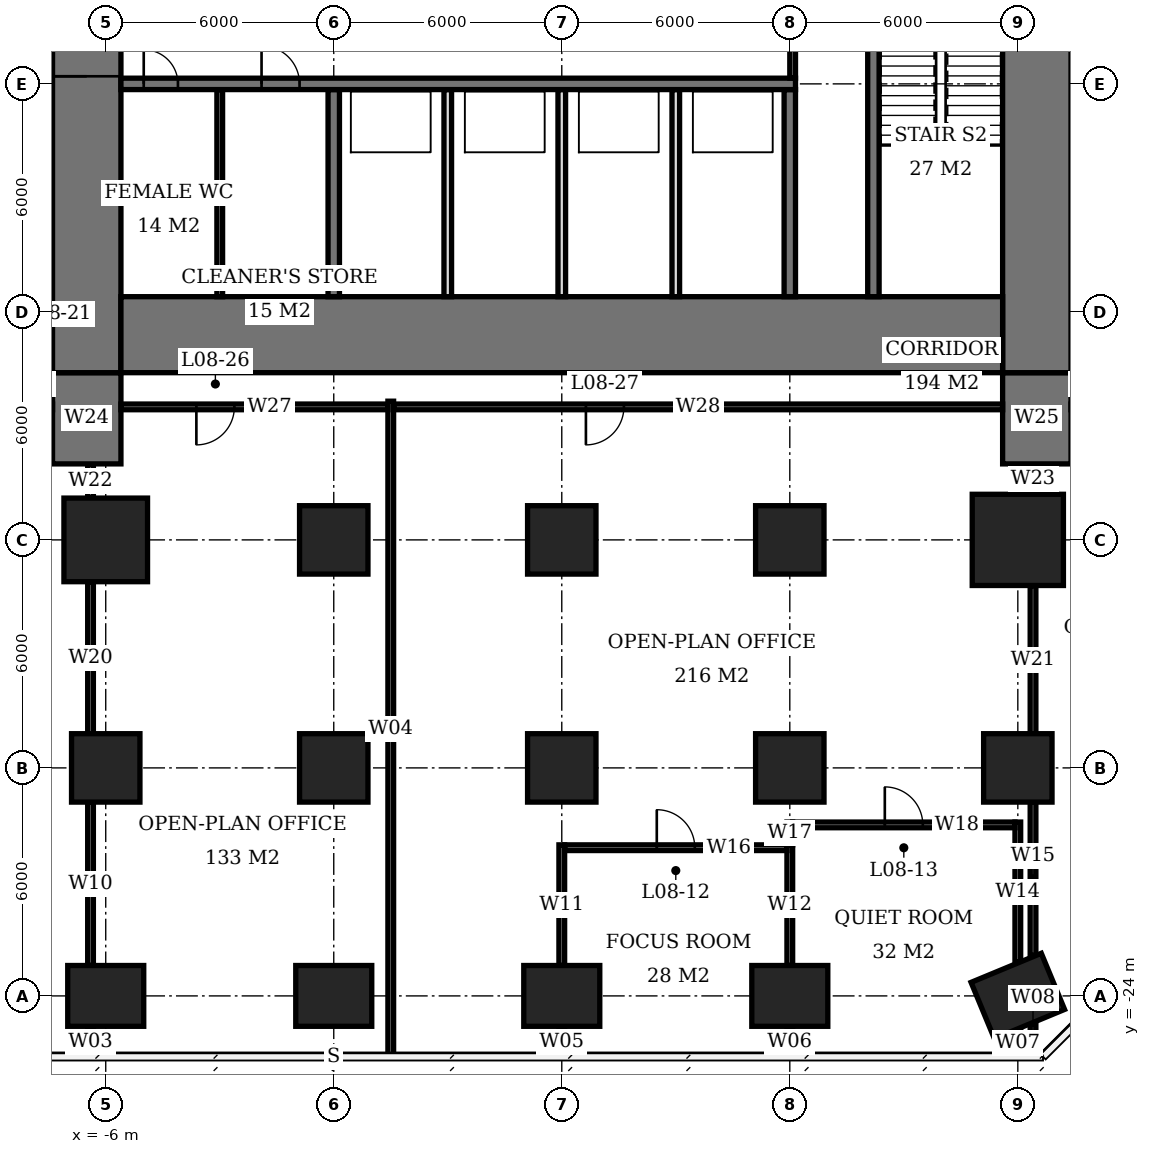
"""IFC4 building model, lengths in metres.
Left out: names, types, materials, properties, quantities, classifications, styles, units other than length and angle.
Written with IfcOpenShell. Run it as: python <this file> out.ifc"""

import sys

from ifc_helpers import new_model, si_unit, direction, frame, frame_2d, origin, origin_2d, place, context, subcontext, project, spatial, rectangle, extrude, element, fill, save


model = new_model("IFC4")
c1 = context("Model", 3, precision=1e-05, world=origin(), true_north=direction((0.0, 1.0)))
c2 = subcontext(c1, "Body", "Model", "MODEL_VIEW")
j1 = project(units=[si_unit("LENGTHUNIT", "METRE"), si_unit("PLANEANGLEUNIT", "RADIAN")], contexts=[c1])
p1 = place(None, origin())
s1 = spatial("IfcSite", under=j1, at=p1, CompositionType="ELEMENT")
p2 = place(p1, origin())
s2 = spatial("IfcBuilding", under=s1, at=p2, CompositionType="ELEMENT")
p3 = place(p2, frame((0.0, 0.0, 37.7)))
s3 = spatial("IfcBuildingStorey", under=s2, at=p3, CompositionType="ELEMENT", Elevation=37.7)
p4 = place(p3, frame((-6.0, -24.0, 0.0), z_axis=(0.0, 0.0, 1.0), x_axis=(1.0, 0.0, 0.0)))
e1 = element("IfcColumn", 1, at=p4, inside=s3, PredefinedType="COLUMN", context=c2, shape_type="SweptSolid", body=[
    extrude(rectangle(XDim=2.0, YDim=1.6, at=origin_2d()), origin(), (0.0, 0.0, 1.0), 3.9),
])
p5 = place(p3, frame((-6.0, -18.0, 0.0), z_axis=(0.0, 0.0, 1.0), x_axis=(1.0, 0.0, 0.0)))
e2 = element("IfcColumn", 2, at=p5, inside=s3, PredefinedType="COLUMN", context=c2, shape_type="SweptSolid", body=[
    extrude(rectangle(XDim=1.8, YDim=1.8, at=origin_2d()), origin(), (0.0, 0.0, 1.0), 3.9),
])
p6 = place(p3, frame((-6.0, -12.0, 0.0), z_axis=(0.0, 0.0, 1.0), x_axis=(1.0, 0.0, 0.0)))
e3 = element("IfcColumn", 3, at=p6, inside=s3, PredefinedType="COLUMN", context=c2, shape_type="SweptSolid", body=[
    extrude(rectangle(XDim=2.2, YDim=2.2, at=origin_2d()), origin(), (0.0, 0.0, 1.0), 3.9),
])
p7 = place(p3, frame((0.0, -24.0, 0.0), z_axis=(0.0, 0.0, 1.0), x_axis=(1.0, 0.0, 0.0)))
e4 = element("IfcColumn", 4, at=p7, inside=s3, PredefinedType="COLUMN", context=c2, shape_type="SweptSolid", body=[
    extrude(rectangle(XDim=2.0, YDim=1.6, at=origin_2d()), origin(), (0.0, 0.0, 1.0), 3.9),
])
for number, where, z_axis, x_axis in (
    (5, (0.0, -18.0, 0.0), (0.0, 0.0, 1.0), (1.0, 0.0, 0.0)),
    (6, (0.0, -12.0, 0.0), (0.0, 0.0, 1.0), (1.0, 0.0, 0.0)),
):
    element("IfcColumn", number, at=place(p3, frame(where, z_axis=z_axis, x_axis=x_axis)), inside=s3, PredefinedType="COLUMN", context=c2, shape_type="SweptSolid", body=[
        extrude(rectangle(XDim=1.8, YDim=1.8, at=origin_2d()), origin(), (0.0, 0.0, 1.0), 3.9),
    ])
p8 = place(p3, frame((6.0, -24.0, 0.0), z_axis=(0.0, 0.0, 1.0), x_axis=(1.0, 0.0, 0.0)))
e7 = element("IfcColumn", 7, at=p8, inside=s3, PredefinedType="COLUMN", context=c2, shape_type="SweptSolid", body=[
    extrude(rectangle(XDim=2.0, YDim=1.6, at=origin_2d()), origin(), (0.0, 0.0, 1.0), 3.9),
])
for number, where, z_axis, x_axis in (
    (8, (6.0, -18.0, 0.0), (0.0, 0.0, 1.0), (1.0, 0.0, 0.0)),
    (9, (6.0, -12.0, 0.0), (0.0, 0.0, 1.0), (1.0, 0.0, 0.0)),
):
    element("IfcColumn", number, at=place(p3, frame(where, z_axis=z_axis, x_axis=x_axis)), inside=s3, PredefinedType="COLUMN", context=c2, shape_type="SweptSolid", body=[
        extrude(rectangle(XDim=1.8, YDim=1.8, at=origin_2d()), origin(), (0.0, 0.0, 1.0), 3.9),
    ])
p9 = place(p3, frame((12.0, -24.0, 0.0), z_axis=(0.0, 0.0, 1.0), x_axis=(1.0, 0.0, 0.0)))
e10 = element("IfcColumn", 10, at=p9, inside=s3, PredefinedType="COLUMN", context=c2, shape_type="SweptSolid", body=[
    extrude(rectangle(XDim=2.0, YDim=1.6, at=origin_2d()), origin(), (0.0, 0.0, 1.0), 3.9),
])
for number, where, z_axis, x_axis in (
    (11, (12.0, -18.0, 0.0), (0.0, 0.0, 1.0), (1.0, 0.0, 0.0)),
    (12, (12.0, -12.0, 0.0), (0.0, 0.0, 1.0), (1.0, 0.0, 0.0)),
):
    element("IfcColumn", number, at=place(p3, frame(where, z_axis=z_axis, x_axis=x_axis)), inside=s3, PredefinedType="COLUMN", context=c2, shape_type="SweptSolid", body=[
        extrude(rectangle(XDim=1.8, YDim=1.8, at=origin_2d()), origin(), (0.0, 0.0, 1.0), 3.9),
    ])
p10 = place(p3, frame((18.0, -24.0, 0.0), z_axis=(0.0, 0.0, 1.0), x_axis=(-0.923879532511, -0.382683432365, 0.0)))
e13 = element("IfcColumn", 13, at=p10, inside=s3, PredefinedType="COLUMN", context=c2, shape_type="SweptSolid", body=[
    extrude(rectangle(XDim=2.0, YDim=1.6, at=origin_2d()), origin(), (0.0, 0.0, 1.0), 3.9),
])
p11 = place(p3, frame((18.0, -18.0, 0.0), z_axis=(0.0, 0.0, 1.0), x_axis=(1.0, 0.0, 0.0)))
e14 = element("IfcColumn", 14, at=p11, inside=s3, PredefinedType="COLUMN", context=c2, shape_type="SweptSolid", body=[
    extrude(rectangle(XDim=1.8, YDim=1.8, at=origin_2d()), origin(), (0.0, 0.0, 1.0), 3.9),
])
p12 = place(p3, frame((18.0, -12.0, 0.0), z_axis=(0.0, 0.0, 1.0), x_axis=(1.0, 0.0, 0.0)))
e15 = element("IfcColumn", 15, at=p12, inside=s3, PredefinedType="COLUMN", context=c2, shape_type="SweptSolid", body=[
    extrude(rectangle(XDim=2.4, YDim=2.4, at=origin_2d()), origin(), (0.0, 0.0, 1.0), 3.9),
])
p13 = place(p3, frame((-5.6, -6.6, 0.0), z_axis=(0.0, 0.0, 1.0), x_axis=(1.0, 0.0, 0.0)))
e16 = element("IfcWall", 16, at=p13, inside=s3, PredefinedType="SHEAR", context=c2, shape_type="SweptSolid", body=[
    extrude(rectangle(XDim=23.2, YDim=2.0, at=frame_2d((11.6, 0.0))), origin(), (0.0, 0.0, 1.0), 3.9),
])
p14 = place(p3, frame((-6.5, -7.6, 0.0), z_axis=(0.0, 0.0, 1.0), x_axis=(0.0, 1.0, 0.0)))
e17 = element("IfcWall", 17, at=p14, inside=s3, PredefinedType="SHEAR", context=c2, shape_type="SweptSolid", body=[
    extrude(rectangle(XDim=21.2, YDim=1.8, at=frame_2d((10.6, 0.0))), origin(), (0.0, 0.0, 1.0), 3.9),
])
p15 = place(p14, frame((7.8, 0.0, 0.0)))
e18 = element("IfcOpeningElement", 18, at=p15, cuts=e17, PredefinedType="OPENING", context=c2, shape_type="SweptSolid", body=[
    extrude(rectangle(XDim=1.8, YDim=2.4, at=frame_2d((0.9, 1.2))), frame((0.0, 0.91, 0.0), z_axis=(0.0, -1.0, 0.0), x_axis=(1.0, 0.0, 0.0)), (0.0, 0.0, 1.0), 1.82),
])
p16 = place(p3, frame((18.5, -7.6, 0.0), z_axis=(0.0, 0.0, 1.0), x_axis=(0.0, 1.0, 0.0)))
e19 = element("IfcWall", 19, at=p16, inside=s3, PredefinedType="SHEAR", context=c2, shape_type="SweptSolid", body=[
    extrude(rectangle(XDim=21.2, YDim=1.8, at=frame_2d((10.6, 0.0))), origin(), (0.0, 0.0, 1.0), 3.9),
])
p17 = place(p16, frame((9.2, 0.0, 0.0)))
e20 = element("IfcOpeningElement", 20, at=p17, cuts=e19, PredefinedType="OPENING", context=c2, shape_type="SweptSolid", body=[
    extrude(rectangle(XDim=1.8, YDim=2.4, at=frame_2d((0.9, 1.2))), frame((0.0, 0.91, 0.0), z_axis=(0.0, -1.0, 0.0), x_axis=(1.0, 0.0, 0.0)), (0.0, 0.0, 1.0), 1.82),
])
for number, where, z_axis, x_axis in (
    (21, (-6.5, -10.0, 0.0), (0.0, 0.0, 1.0), (0.0, 1.0, 0.0)),
    (22, (18.5, -10.0, 0.0), (0.0, 0.0, 1.0), (0.0, 1.0, 0.0)),
):
    element("IfcWall", number, at=place(p3, frame(where, z_axis=z_axis, x_axis=x_axis)), inside=s3, PredefinedType="SHEAR", context=c2, shape_type="SweptSolid", body=[
        extrude(rectangle(XDim=2.4, YDim=1.8, at=frame_2d((1.2, 0.0))), origin(), (0.0, 0.0, 1.0), 3.9),
    ])
p18 = place(p3, frame((-5.6, 0.0, 0.0), z_axis=(0.0, 0.0, 1.0), x_axis=(1.0, 0.0, 0.0)))
e23 = element("IfcWall", 23, at=p18, inside=s3, PredefinedType="SHEAR", context=c2, shape_type="SweptSolid", body=[
    extrude(rectangle(XDim=17.75, YDim=0.3, at=frame_2d((8.875, 0.0))), origin(), (0.0, 0.0, 1.0), 3.9),
])
p19 = place(p18, frame((0.6, 0.0, 0.0)))
e24 = element("IfcOpeningElement", 24, at=p19, cuts=e23, PredefinedType="OPENING", context=c2, shape_type="SweptSolid", body=[
    extrude(rectangle(XDim=0.9, YDim=2.1, at=frame_2d((0.45, 1.05))), frame((0.0, 0.16, 0.0), z_axis=(0.0, -1.0, 0.0), x_axis=(1.0, 0.0, 0.0)), (0.0, 0.0, 1.0), 0.32),
])
p20 = place(p18, frame((3.7, 0.0, 0.0)))
e25 = element("IfcOpeningElement", 25, at=p20, cuts=e23, PredefinedType="OPENING", context=c2, shape_type="SweptSolid", body=[
    extrude(rectangle(XDim=1.0, YDim=2.1, at=frame_2d((0.5, 1.05))), frame((0.0, 0.16, 0.0), z_axis=(0.0, -1.0, 0.0), x_axis=(1.0, 0.0, 0.0)), (0.0, 0.0, 1.0), 0.32),
])
for number, where, z_axis, x_axis in (
    (26, (0.0, -5.6, 0.0), (0.0, 0.0, 1.0), (0.0, 1.0, 0.0)),
    (27, (12.0, -5.6, 0.0), (0.0, 0.0, 1.0), (0.0, 1.0, 0.0)),
):
    element("IfcWall", number, at=place(p3, frame(where, z_axis=z_axis, x_axis=x_axis)), inside=s3, PredefinedType="SHEAR", context=c2, shape_type="SweptSolid", body=[
        extrude(rectangle(XDim=5.45, YDim=0.3, at=frame_2d((2.725, 0.0))), origin(), (0.0, 0.0, 1.0), 3.9),
    ])
p21 = place(p3, frame((14.2, -5.6, 0.0), z_axis=(0.0, 0.0, 1.0), x_axis=(0.0, 1.0, 0.0)))
e28 = element("IfcWall", 28, at=p21, inside=s3, PredefinedType="SHEAR", context=c2, shape_type="SweptSolid", body=[
    extrude(rectangle(XDim=8.45, YDim=0.3, at=frame_2d((4.225, 0.0))), origin(), (0.0, 0.0, 1.0), 3.9),
])
for number, where, z_axis, x_axis in (
    (29, (3.0, -5.6, 0.0), (0.0, 0.0, 1.0), (0.0, 1.0, 0.0)),
    (30, (6.0, -5.6, 0.0), (0.0, 0.0, 1.0), (0.0, 1.0, 0.0)),
    (31, (9.0, -5.6, 0.0), (0.0, 0.0, 1.0), (0.0, 1.0, 0.0)),
):
    element("IfcWall", number, at=place(p3, frame(where, z_axis=z_axis, x_axis=x_axis)), inside=s3, PredefinedType="SOLIDWALL", context=c2, shape_type="SweptSolid", body=[
        extrude(rectangle(XDim=5.45, YDim=0.2, at=frame_2d((2.725, 0.0))), origin(), (0.0, 0.0, 1.0), 3.9),
    ])
p22 = place(p3, frame((-3.0, -5.6, 0.0), z_axis=(0.0, 0.0, 1.0), x_axis=(0.0, 1.0, 0.0)))
e32 = element("IfcWall", 32, at=p22, inside=s3, PredefinedType="PLUMBINGWALL", context=c2, shape_type="SweptSolid", body=[
    extrude(rectangle(XDim=5.45, YDim=0.15, at=frame_2d((2.725, 0.0))), origin(), (0.0, 0.0, 1.0), 3.65),
])
p23 = place(p3, frame((6.075, -20.1, 0.0), z_axis=(0.0, 0.0, 1.0), x_axis=(1.0, 0.0, 0.0)))
e33 = element("IfcWall", 33, at=p23, inside=s3, PredefinedType="PARTITIONING", context=c2, shape_type="SweptSolid", body=[
    extrude(rectangle(XDim=5.85, YDim=0.15, at=frame_2d((2.925, 0.0))), origin(), (0.0, 0.0, 1.0), 3.65),
])
p24 = place(p23, frame((2.425, 0.0, 0.0)))
e34 = element("IfcOpeningElement", 34, at=p24, cuts=e33, PredefinedType="OPENING", context=c2, shape_type="SweptSolid", body=[
    extrude(rectangle(XDim=1.0, YDim=2.1, at=frame_2d((0.5, 1.05))), frame((0.0, 0.085, 0.0), z_axis=(0.0, -1.0, 0.0), x_axis=(1.0, 0.0, 0.0)), (0.0, 0.0, 1.0), 0.17),
])
p25 = place(p3, frame((12.075, -19.5, 0.0), z_axis=(0.0, 0.0, 1.0), x_axis=(1.0, 0.0, 0.0)))
e35 = element("IfcWall", 35, at=p25, inside=s3, PredefinedType="PARTITIONING", context=c2, shape_type="SweptSolid", body=[
    extrude(rectangle(XDim=5.85, YDim=0.15, at=frame_2d((2.925, 0.0))), origin(), (0.0, 0.0, 1.0), 3.65),
])
p26 = place(p25, frame((2.425, 0.0, 0.0)))
e36 = element("IfcOpeningElement", 36, at=p26, cuts=e35, PredefinedType="OPENING", context=c2, shape_type="SweptSolid", body=[
    extrude(rectangle(XDim=1.0, YDim=2.1, at=frame_2d((0.5, 1.05))), frame((0.0, 0.085, 0.0), z_axis=(0.0, -1.0, 0.0), x_axis=(1.0, 0.0, 0.0)), (0.0, 0.0, 1.0), 0.17),
])
p27 = place(p3, frame((6.0, -25.6, 0.0), z_axis=(0.0, 0.0, 1.0), x_axis=(0.0, 1.0, 0.0)))
e37 = element("IfcWall", 37, at=p27, inside=s3, PredefinedType="PARTITIONING", context=c2, shape_type="SweptSolid", body=[
    extrude(rectangle(XDim=0.8, YDim=0.15, at=frame_2d((0.4, 0.0))), origin(), (0.0, 0.0, 1.0), 3.65),
])
p28 = place(p3, frame((6.0, -23.2, 0.0), z_axis=(0.0, 0.0, 1.0), x_axis=(0.0, 1.0, 0.0)))
e38 = element("IfcWall", 38, at=p28, inside=s3, PredefinedType="PARTITIONING", context=c2, shape_type="SweptSolid", body=[
    extrude(rectangle(XDim=3.175, YDim=0.15, at=frame_2d((1.587, 0.0))), origin(), (0.0, 0.0, 1.0), 3.65),
])
p29 = place(p3, frame((12.0, -25.6, 0.0), z_axis=(0.0, 0.0, 1.0), x_axis=(0.0, 1.0, 0.0)))
e39 = element("IfcWall", 39, at=p29, inside=s3, PredefinedType="PARTITIONING", context=c2, shape_type="SweptSolid", body=[
    extrude(rectangle(XDim=0.8, YDim=0.15, at=frame_2d((0.4, 0.0))), origin(), (0.0, 0.0, 1.0), 3.65),
])
p30 = place(p3, frame((12.0, -23.2, 0.0), z_axis=(0.0, 0.0, 1.0), x_axis=(0.0, 1.0, 0.0)))
e40 = element("IfcWall", 40, at=p30, inside=s3, PredefinedType="PARTITIONING", context=c2, shape_type="SweptSolid", body=[
    extrude(rectangle(XDim=3.175, YDim=0.15, at=frame_2d((1.587, 0.0))), origin(), (0.0, 0.0, 1.0), 3.65),
])
p31 = place(p3, frame((12.0, -20.025, 0.0), z_axis=(0.0, 0.0, 1.0), x_axis=(0.0, 1.0, 0.0)))
e41 = element("IfcWall", 41, at=p31, inside=s3, PredefinedType="PARTITIONING", context=c2, shape_type="SweptSolid", body=[
    extrude(rectangle(XDim=0.6, YDim=0.15, at=frame_2d((0.3, 0.0))), origin(), (0.0, 0.0, 1.0), 3.65),
])
p32 = place(p3, frame((18.0, -25.6, 0.0), z_axis=(0.0, 0.0, 1.0), x_axis=(0.0, 1.0, 0.0)))
e42 = element("IfcWall", 42, at=p32, inside=s3, PredefinedType="PARTITIONING", context=c2, shape_type="SweptSolid", body=[
    extrude(rectangle(XDim=0.703, YDim=0.15, at=frame_2d((0.352, 0.0))), origin(), (0.0, 0.0, 1.0), 3.65),
])
p33 = place(p3, frame((18.0, -23.103, 0.0), z_axis=(0.0, 0.0, 1.0), x_axis=(0.0, 1.0, 0.0)))
e43 = element("IfcWall", 43, at=p33, inside=s3, PredefinedType="PARTITIONING", context=c2, shape_type="SweptSolid", body=[
    extrude(rectangle(XDim=3.678, YDim=0.15, at=frame_2d((1.839, 0.0))), origin(), (0.0, 0.0, 1.0), 3.65),
])
p34 = place(p3, frame((-6.4, -25.6, 0.0), z_axis=(0.0, 0.0, 1.0), x_axis=(0.0, 1.0, 0.0)))
e44 = element("IfcWall", 44, at=p34, inside=s3, PredefinedType="PARTITIONING", context=c2, shape_type="SweptSolid", body=[
    extrude(rectangle(XDim=0.8, YDim=0.15, at=frame_2d((0.4, 0.0))), origin(), (0.0, 0.0, 1.0), 3.65),
])
p35 = place(p3, frame((-6.4, -23.2, 0.0), z_axis=(0.0, 0.0, 1.0), x_axis=(0.0, 1.0, 0.0)))
e45 = element("IfcWall", 45, at=p35, inside=s3, PredefinedType="PARTITIONING", context=c2, shape_type="SweptSolid", body=[
    extrude(rectangle(XDim=4.3, YDim=0.15, at=frame_2d((2.15, 0.0))), origin(), (0.0, 0.0, 1.0), 3.65),
])
p36 = place(p3, frame((-6.4, -17.1, 0.0), z_axis=(0.0, 0.0, 1.0), x_axis=(0.0, 1.0, 0.0)))
e46 = element("IfcWall", 46, at=p36, inside=s3, PredefinedType="PARTITIONING", context=c2, shape_type="SweptSolid", body=[
    extrude(rectangle(XDim=4.0, YDim=0.15, at=frame_2d((2.0, 0.0))), origin(), (0.0, 0.0, 1.0), 3.65),
])
p37 = place(p3, frame((-6.4, -10.9, 0.0), z_axis=(0.0, 0.0, 1.0), x_axis=(0.0, 1.0, 0.0)))
e47 = element("IfcWall", 47, at=p37, inside=s3, PredefinedType="PARTITIONING", context=c2, shape_type="SweptSolid", body=[
    extrude(rectangle(XDim=0.9, YDim=0.15, at=frame_2d((0.45, 0.0))), origin(), (0.0, 0.0, 1.0), 3.65),
])
p38 = place(p3, frame((1.425, -8.5, 0.0), z_axis=(0.0, 0.0, 1.0), x_axis=(-1.0, 0.0, 0.0)))
e48 = element("IfcWall", 48, at=p38, inside=s3, PredefinedType="PARTITIONING", context=c2, shape_type="SweptSolid", body=[
    extrude(rectangle(XDim=7.025, YDim=0.15, at=frame_2d((3.513, 0.0))), origin(), (0.0, 0.0, 1.0), 3.65),
])
p39 = place(p38, frame((4.04, 0.0, 0.0)))
e49 = element("IfcOpeningElement", 49, at=p39, cuts=e48, PredefinedType="OPENING", context=c2, shape_type="SweptSolid", body=[
    extrude(rectangle(XDim=1.0, YDim=2.1, at=frame_2d((0.5, 1.05))), frame((0.0, 0.085, 0.0), z_axis=(0.0, -1.0, 0.0), x_axis=(1.0, 0.0, 0.0)), (0.0, 0.0, 1.0), 0.17),
])
p40 = place(p3, frame((1.5, -25.6, 0.0), z_axis=(0.0, 0.0, 1.0), x_axis=(0.0, 1.0, 0.0)))
e50 = element("IfcWall", 50, at=p40, inside=s3, PredefinedType="PARTITIONING", context=c2, shape_type="SweptSolid", body=[
    extrude(rectangle(XDim=17.25, YDim=0.15, at=frame_2d((8.625, 0.0))), origin(), (0.0, 0.0, 1.0), 3.65),
])
p41 = place(p3, frame((17.6, -8.5, 0.0), z_axis=(0.0, 0.0, 1.0), x_axis=(-1.0, 0.0, 0.0)))
e51 = element("IfcWall", 51, at=p41, inside=s3, PredefinedType="PARTITIONING", context=c2, shape_type="SweptSolid", body=[
    extrude(rectangle(XDim=16.025, YDim=0.15, at=frame_2d((8.013, 0.0))), origin(), (0.0, 0.0, 1.0), 3.65),
])
p42 = place(p41, frame((9.965, 0.0, 0.0)))
e52 = element("IfcOpeningElement", 52, at=p42, cuts=e51, PredefinedType="OPENING", context=c2, shape_type="SweptSolid", body=[
    extrude(rectangle(XDim=1.0, YDim=2.1, at=frame_2d((0.5, 1.05))), frame((0.0, 0.085, 0.0), z_axis=(0.0, -1.0, 0.0), x_axis=(1.0, 0.0, 0.0)), (0.0, 0.0, 1.0), 0.17),
])
p43 = place(p3, frame((18.4, -25.6, 0.0), z_axis=(0.0, 0.0, 1.0), x_axis=(0.0, 1.0, 0.0)))
e53 = element("IfcWall", 53, at=p43, inside=s3, PredefinedType="PARTITIONING", context=c2, shape_type="SweptSolid", body=[
    extrude(rectangle(XDim=0.869, YDim=0.15, at=frame_2d((0.435, 0.0))), origin(), (0.0, 0.0, 1.0), 3.65),
])
p44 = place(p3, frame((18.4, -22.937, 0.0), z_axis=(0.0, 0.0, 1.0), x_axis=(0.0, 1.0, 0.0)))
e54 = element("IfcWall", 54, at=p44, inside=s3, PredefinedType="PARTITIONING", context=c2, shape_type="SweptSolid", body=[
    extrude(rectangle(XDim=4.037, YDim=0.15, at=frame_2d((2.019, 0.0))), origin(), (0.0, 0.0, 1.0), 3.65),
])
p45 = place(p3, frame((18.4, -17.1, 0.0), z_axis=(0.0, 0.0, 1.0), x_axis=(0.0, 1.0, 0.0)))
e55 = element("IfcWall", 55, at=p45, inside=s3, PredefinedType="PARTITIONING", context=c2, shape_type="SweptSolid", body=[
    extrude(rectangle(XDim=3.9, YDim=0.15, at=frame_2d((1.95, 0.0))), origin(), (0.0, 0.0, 1.0), 3.65),
])
p46 = place(p3, frame((18.4, -10.8, 0.0), z_axis=(0.0, 0.0, 1.0), x_axis=(0.0, 1.0, 0.0)))
e56 = element("IfcWall", 56, at=p46, inside=s3, PredefinedType="PARTITIONING", context=c2, shape_type="SweptSolid", body=[
    extrude(rectangle(XDim=0.8, YDim=0.15, at=frame_2d((0.4, 0.0))), origin(), (0.0, 0.0, 1.0), 3.65),
])
p47 = place(p3, frame((19.4, -8.5, 0.0), z_axis=(0.0, 0.0, 1.0), x_axis=(1.0, 0.0, 0.0)))
e57 = element("IfcWall", 57, at=p47, inside=s3, PredefinedType="PARTITIONING", context=c2, shape_type="SweptSolid", body=[
    extrude(rectangle(XDim=1.175, YDim=0.15, at=frame_2d((0.587, 0.0))), origin(), (0.0, 0.0, 1.0), 3.65),
])
p48 = place(p3, frame((12.075, 0.15, 0.0), z_axis=(0.0, 0.0, 1.0), x_axis=(0.0, 1.0, 0.0)))
e58 = element("IfcWall", 58, at=p48, inside=s3, PredefinedType="PARTITIONING", context=c2, shape_type="SweptSolid", body=[
    extrude(rectangle(XDim=3.0, YDim=0.15, at=frame_2d((1.5, 0.0))), origin(), (0.0, 0.0, 1.0), 3.65),
])
p49 = place(p15, origin())
e59 = element("IfcDoor", 59, at=p49, inside=s3, OperationType="DOUBLE_DOOR_SINGLE_SWING", PredefinedType="DOOR", context=c2, shape_type="SweptSolid", body=[
    extrude(rectangle(XDim=1.8, YDim=2.4, at=frame_2d((0.9, 1.2))), frame((0.0, 0.025, 0.0), z_axis=(0.0, -1.0, 0.0), x_axis=(1.0, 0.0, 0.0)), (0.0, 0.0, 1.0), 0.05),
])
fill(e18, e59)
p50 = place(p19, origin())
e60 = element("IfcDoor", 60, at=p50, inside=s3, OperationType="SINGLE_SWING_LEFT", PredefinedType="DOOR", context=c2, shape_type="SweptSolid", body=[
    extrude(rectangle(XDim=0.9, YDim=2.1, at=frame_2d((0.45, 1.05))), frame((0.0, 0.025, 0.0), z_axis=(0.0, -1.0, 0.0), x_axis=(1.0, 0.0, 0.0)), (0.0, 0.0, 1.0), 0.05),
])
fill(e24, e60)
p51 = place(p20, origin())
e61 = element("IfcDoor", 61, at=p51, inside=s3, OperationType="SINGLE_SWING_LEFT", PredefinedType="DOOR", context=c2, shape_type="SweptSolid", body=[
    extrude(rectangle(XDim=1.0, YDim=2.1, at=frame_2d((0.5, 1.05))), frame((0.0, 0.025, 0.0), z_axis=(0.0, -1.0, 0.0), x_axis=(1.0, 0.0, 0.0)), (0.0, 0.0, 1.0), 0.05),
])
fill(e25, e61)
p52 = place(p24, origin())
e62 = element("IfcDoor", 62, at=p52, inside=s3, OperationType="SINGLE_SWING_LEFT", PredefinedType="DOOR", context=c2, shape_type="SweptSolid", body=[
    extrude(rectangle(XDim=1.0, YDim=2.1, at=frame_2d((0.5, 1.05))), frame((0.0, 0.025, 0.0), z_axis=(0.0, -1.0, 0.0), x_axis=(1.0, 0.0, 0.0)), (0.0, 0.0, 1.0), 0.05),
])
fill(e34, e62)
p53 = place(p26, origin())
e63 = element("IfcDoor", 63, at=p53, inside=s3, OperationType="SINGLE_SWING_LEFT", PredefinedType="DOOR", context=c2, shape_type="SweptSolid", body=[
    extrude(rectangle(XDim=1.0, YDim=2.1, at=frame_2d((0.5, 1.05))), frame((0.0, 0.025, 0.0), z_axis=(0.0, -1.0, 0.0), x_axis=(1.0, 0.0, 0.0)), (0.0, 0.0, 1.0), 0.05),
])
fill(e36, e63)
p54 = place(p39, origin())
e64 = element("IfcDoor", 64, at=p54, inside=s3, OperationType="SINGLE_SWING_RIGHT", PredefinedType="DOOR", context=c2, shape_type="SweptSolid", body=[
    extrude(rectangle(XDim=1.0, YDim=2.1, at=frame_2d((0.5, 1.05))), frame((0.0, 0.025, 0.0), z_axis=(0.0, -1.0, 0.0), x_axis=(1.0, 0.0, 0.0)), (0.0, 0.0, 1.0), 0.05),
])
fill(e49, e64)
p55 = place(p42, origin())
e65 = element("IfcDoor", 65, at=p55, inside=s3, OperationType="SINGLE_SWING_RIGHT", PredefinedType="DOOR", context=c2, shape_type="SweptSolid", body=[
    extrude(rectangle(XDim=1.0, YDim=2.1, at=frame_2d((0.5, 1.05))), frame((0.0, 0.025, 0.0), z_axis=(0.0, -1.0, 0.0), x_axis=(1.0, 0.0, 0.0)), (0.0, 0.0, 1.0), 0.05),
])
fill(e52, e65)
save(model, sys.argv[1])
